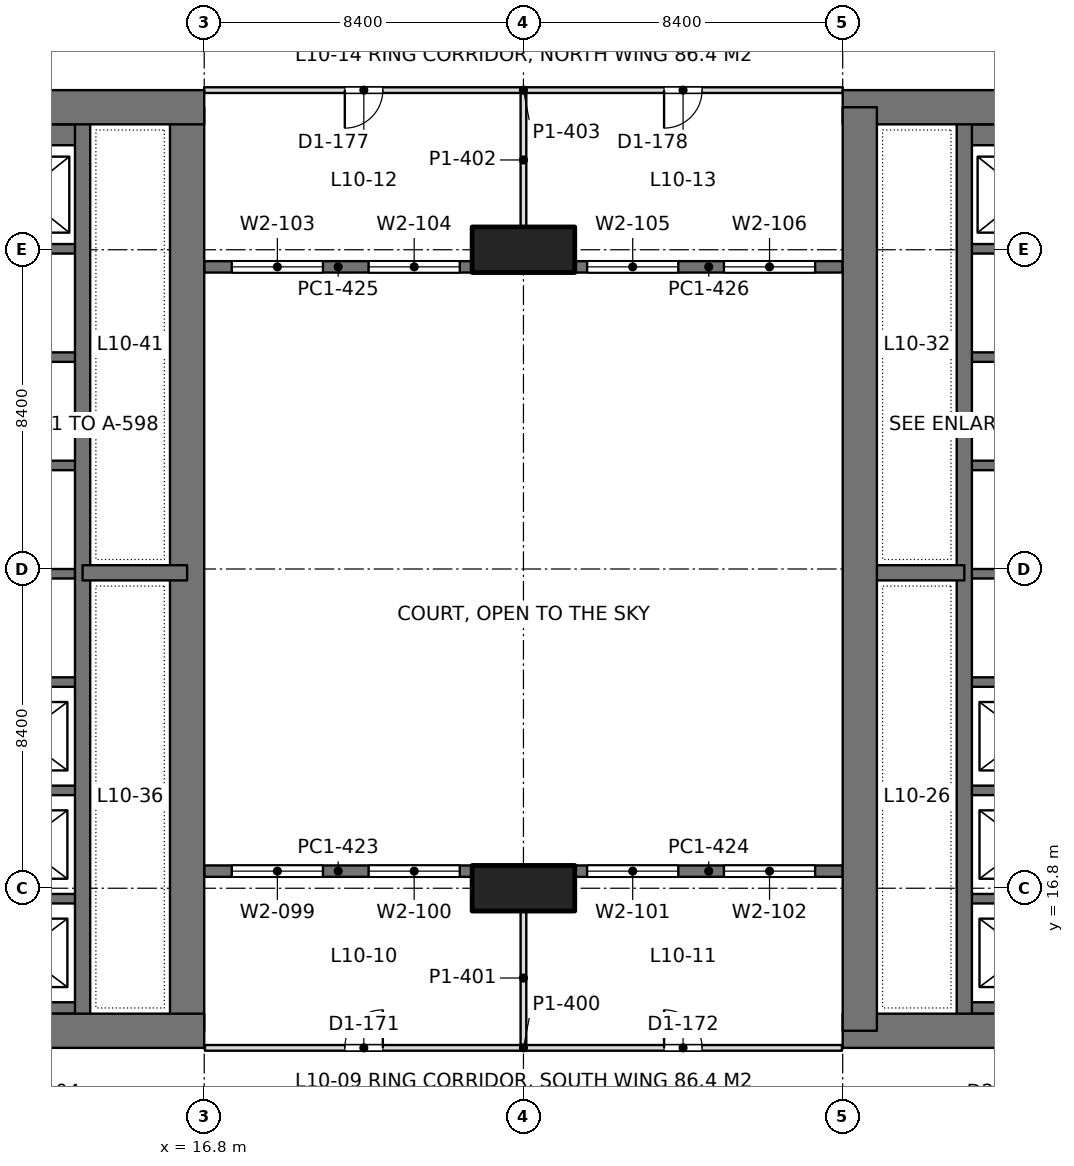
"""IFC4 building model, lengths in metres.
Left out: names, types, materials, properties, quantities, classifications, styles, units other than length and angle.
Written with IfcOpenShell. Run it as: python <this file> out.ifc"""

import sys

from ifc_helpers import new_model, si_unit, direction, frame, frame_2d, origin, origin_2d, place, context, subcontext, project, spatial, rectangle, extrude, element, fill, save


model = new_model("IFC4")
c1 = context("Model", 3, precision=1e-05, world=origin(), true_north=direction((0.0, 1.0)))
c2 = subcontext(c1, "Body", "Model", "MODEL_VIEW")
j1 = project(units=[si_unit("LENGTHUNIT", "METRE"), si_unit("PLANEANGLEUNIT", "RADIAN")], contexts=[c1])
p1 = place(None, origin())
s1 = spatial("IfcSite", under=j1, at=p1, CompositionType="ELEMENT")
p2 = place(p1, origin())
s2 = spatial("IfcBuilding", under=s1, at=p2, CompositionType="ELEMENT")
p3 = place(p2, frame((0.0, 0.0, 45.9)))
s3 = spatial("IfcBuildingStorey", under=s2, at=p3, CompositionType="ELEMENT", Elevation=45.9)
for number, where, z_axis, x_axis in (
    (1, (25.2, 16.8, 0.0), (0.0, 0.0, 1.0), (1.0, 0.0, 0.0)),
    (2, (25.2, 33.6, 0.0), (0.0, 0.0, 1.0), (1.0, 0.0, 0.0)),
):
    element("IfcColumn", number, at=place(p3, frame(where, z_axis=z_axis, x_axis=x_axis)), inside=s3, PredefinedType="COLUMN", context=c2, shape_type="SweptSolid", body=[
        extrude(rectangle(XDim=2.7, YDim=1.2, at=origin_2d()), origin(), (0.0, 0.0, 1.0), 4.5),
    ])
p4 = place(p3, frame((-1.2, 13.05, 0.0), z_axis=(0.0, 0.0, 1.0), x_axis=(1.0, 0.0, 0.0)))
e3 = element("IfcWall", 3, at=p4, inside=s3, PredefinedType="SHEAR", context=c2, shape_type="SweptSolid", body=[
    extrude(rectangle(XDim=18.0, YDim=0.9, at=frame_2d((9.0, 0.0))), origin(), (0.0, 0.0, 1.0), 4.5),
])
p5 = place(p4, frame((8.95, 0.0, 0.0)))
e4 = element("IfcOpeningElement", 4, at=p5, cuts=e3, PredefinedType="OPENING", context=c2, shape_type="SweptSolid", body=[
    extrude(rectangle(XDim=1.8, YDim=2.4, at=frame_2d((0.9, 1.2))), frame((0.0, 0.46, 0.0), z_axis=(0.0, -1.0, 0.0), x_axis=(1.0, 0.0, 0.0)), (0.0, 0.0, 1.0), 0.92),
])
p6 = place(p3, frame((-1.2, 37.35, 0.0), z_axis=(0.0, 0.0, 1.0), x_axis=(1.0, 0.0, 0.0)))
e5 = element("IfcWall", 5, at=p6, inside=s3, PredefinedType="SHEAR", context=c2, shape_type="SweptSolid", body=[
    extrude(rectangle(XDim=18.0, YDim=0.9, at=frame_2d((9.0, 0.0))), origin(), (0.0, 0.0, 1.0), 4.5),
])
p7 = place(p6, frame((8.95, 0.0, 0.0)))
e6 = element("IfcOpeningElement", 6, at=p7, cuts=e5, PredefinedType="OPENING", context=c2, shape_type="SweptSolid", body=[
    extrude(rectangle(XDim=1.8, YDim=2.4, at=frame_2d((0.9, 1.2))), frame((0.0, 0.46, 0.0), z_axis=(0.0, -1.0, 0.0), x_axis=(1.0, 0.0, 0.0)), (0.0, 0.0, 1.0), 0.92),
])
p8 = place(p3, frame((16.35, 13.05, 0.0), z_axis=(0.0, 0.0, 1.0), x_axis=(0.0, 1.0, 0.0)))
e7 = element("IfcWall", 7, at=p8, inside=s3, PredefinedType="SHEAR", context=c2, shape_type="SweptSolid", body=[
    extrude(rectangle(XDim=24.3, YDim=0.9, at=frame_2d((12.15, 0.0))), origin(), (0.0, 0.0, 1.0), 4.5),
])
p9 = place(p3, frame((13.6, 13.05, 0.0), z_axis=(0.0, 0.0, 1.0), x_axis=(0.0, 1.0, 0.0)))
e8 = element("IfcWall", 8, at=p9, inside=s3, PredefinedType="SHEAR", context=c2, shape_type="SweptSolid", body=[
    extrude(rectangle(XDim=24.3, YDim=0.4, at=frame_2d((12.15, 0.0))), origin(), (0.0, 0.0, 1.0), 4.5),
])
p10 = place(p3, frame((13.6, 25.1, 0.0), z_axis=(0.0, 0.0, 1.0), x_axis=(1.0, 0.0, 0.0)))
e9 = element("IfcWall", 9, at=p10, inside=s3, PredefinedType="SHEAR", context=c2, shape_type="SweptSolid", body=[
    extrude(rectangle(XDim=2.75, YDim=0.4, at=frame_2d((1.375, 0.0))), origin(), (0.0, 0.0, 1.0), 4.5),
])
p11 = place(p3, frame((10.4, 13.65, 0.0), z_axis=(0.0, 0.0, 1.0), x_axis=(1.0, 0.0, 0.0)))
e10 = element("IfcWall", 10, at=p11, inside=s3, PredefinedType="SHEAR", context=c2, shape_type="SweptSolid", body=[
    extrude(rectangle(XDim=3.2, YDim=0.3, at=frame_2d((1.6, 0.0))), origin(), (0.0, 0.0, 1.0), 4.5),
])
for number, where, z_axis, x_axis in (
    (11, (10.4, 16.525, 0.0), (0.0, 0.0, 1.0), (1.0, 0.0, 0.0)),
    (12, (10.4, 19.375, 0.0), (0.0, 0.0, 1.0), (1.0, 0.0, 0.0)),
    (13, (10.4, 22.225, 0.0), (0.0, 0.0, 1.0), (1.0, 0.0, 0.0)),
    (14, (10.4, 25.075, 0.0), (0.0, 0.0, 1.0), (1.0, 0.0, 0.0)),
    (15, (10.4, 27.925, 0.0), (0.0, 0.0, 1.0), (1.0, 0.0, 0.0)),
    (16, (10.4, 30.775, 0.0), (0.0, 0.0, 1.0), (1.0, 0.0, 0.0)),
    (17, (10.4, 33.625, 0.0), (0.0, 0.0, 1.0), (1.0, 0.0, 0.0)),
):
    element("IfcWall", number, at=place(p3, frame(where, z_axis=z_axis, x_axis=x_axis)), inside=s3, PredefinedType="SHEAR", context=c2, shape_type="SweptSolid", body=[
        extrude(rectangle(XDim=3.2, YDim=0.25, at=frame_2d((1.6, 0.0))), origin(), (0.0, 0.0, 1.0), 4.5),
    ])
p12 = place(p3, frame((10.4, 36.625, 0.0), z_axis=(0.0, 0.0, 1.0), x_axis=(1.0, 0.0, 0.0)))
e18 = element("IfcWall", 18, at=p12, inside=s3, PredefinedType="SHEAR", context=c2, shape_type="SweptSolid", body=[
    extrude(rectangle(XDim=3.2, YDim=0.55, at=frame_2d((1.6, 0.0))), origin(), (0.0, 0.0, 1.0), 4.5),
])
p13 = place(p3, frame((33.6, 13.05, 0.0), z_axis=(0.0, 0.0, 1.0), x_axis=(1.0, 0.0, 0.0)))
e19 = element("IfcWall", 19, at=p13, inside=s3, PredefinedType="SHEAR", context=c2, shape_type="SweptSolid", body=[
    extrude(rectangle(XDim=18.0, YDim=0.9, at=frame_2d((9.0, 0.0))), origin(), (0.0, 0.0, 1.0), 4.5),
])
p14 = place(p13, frame((7.25, 0.0, 0.0)))
e20 = element("IfcOpeningElement", 20, at=p14, cuts=e19, PredefinedType="OPENING", context=c2, shape_type="SweptSolid", body=[
    extrude(rectangle(XDim=1.8, YDim=2.4, at=frame_2d((0.9, 1.2))), frame((0.0, 0.46, 0.0), z_axis=(0.0, -1.0, 0.0), x_axis=(1.0, 0.0, 0.0)), (0.0, 0.0, 1.0), 0.92),
])
p15 = place(p3, frame((33.6, 37.35, 0.0), z_axis=(0.0, 0.0, 1.0), x_axis=(1.0, 0.0, 0.0)))
e21 = element("IfcWall", 21, at=p15, inside=s3, PredefinedType="SHEAR", context=c2, shape_type="SweptSolid", body=[
    extrude(rectangle(XDim=18.0, YDim=0.9, at=frame_2d((9.0, 0.0))), origin(), (0.0, 0.0, 1.0), 4.5),
])
p16 = place(p15, frame((7.25, 0.0, 0.0)))
e22 = element("IfcOpeningElement", 22, at=p16, cuts=e21, PredefinedType="OPENING", context=c2, shape_type="SweptSolid", body=[
    extrude(rectangle(XDim=1.8, YDim=2.4, at=frame_2d((0.9, 1.2))), frame((0.0, 0.46, 0.0), z_axis=(0.0, -1.0, 0.0), x_axis=(1.0, 0.0, 0.0)), (0.0, 0.0, 1.0), 0.92),
])
p17 = place(p3, frame((34.05, 13.05, 0.0), z_axis=(0.0, 0.0, 1.0), x_axis=(0.0, 1.0, 0.0)))
e23 = element("IfcWall", 23, at=p17, inside=s3, PredefinedType="SHEAR", context=c2, shape_type="SweptSolid", body=[
    extrude(rectangle(XDim=24.3, YDim=0.9, at=frame_2d((12.15, 0.0))), origin(), (0.0, 0.0, 1.0), 4.5),
])
p18 = place(p3, frame((36.8, 13.05, 0.0), z_axis=(0.0, 0.0, 1.0), x_axis=(0.0, 1.0, 0.0)))
e24 = element("IfcWall", 24, at=p18, inside=s3, PredefinedType="SHEAR", context=c2, shape_type="SweptSolid", body=[
    extrude(rectangle(XDim=24.3, YDim=0.4, at=frame_2d((12.15, 0.0))), origin(), (0.0, 0.0, 1.0), 4.5),
])
p19 = place(p3, frame((36.8, 25.1, 0.0), z_axis=(0.0, 0.0, 1.0), x_axis=(-1.0, 0.0, 0.0)))
e25 = element("IfcWall", 25, at=p19, inside=s3, PredefinedType="SHEAR", context=c2, shape_type="SweptSolid", body=[
    extrude(rectangle(XDim=2.75, YDim=0.4, at=frame_2d((1.375, 0.0))), origin(), (0.0, 0.0, 1.0), 4.5),
])
p20 = place(p3, frame((40.0, 13.65, 0.0), z_axis=(0.0, 0.0, 1.0), x_axis=(-1.0, 0.0, 0.0)))
e26 = element("IfcWall", 26, at=p20, inside=s3, PredefinedType="SHEAR", context=c2, shape_type="SweptSolid", body=[
    extrude(rectangle(XDim=3.2, YDim=0.3, at=frame_2d((1.6, 0.0))), origin(), (0.0, 0.0, 1.0), 4.5),
])
for number, where, z_axis, x_axis in (
    (27, (40.0, 16.525, 0.0), (0.0, 0.0, 1.0), (-1.0, 0.0, 0.0)),
    (28, (40.0, 19.375, 0.0), (0.0, 0.0, 1.0), (-1.0, 0.0, 0.0)),
    (29, (40.0, 22.225, 0.0), (0.0, 0.0, 1.0), (-1.0, 0.0, 0.0)),
    (30, (40.0, 25.075, 0.0), (0.0, 0.0, 1.0), (-1.0, 0.0, 0.0)),
    (31, (40.0, 27.925, 0.0), (0.0, 0.0, 1.0), (-1.0, 0.0, 0.0)),
    (32, (40.0, 30.775, 0.0), (0.0, 0.0, 1.0), (-1.0, 0.0, 0.0)),
    (33, (40.0, 33.625, 0.0), (0.0, 0.0, 1.0), (-1.0, 0.0, 0.0)),
):
    element("IfcWall", number, at=place(p3, frame(where, z_axis=z_axis, x_axis=x_axis)), inside=s3, PredefinedType="SHEAR", context=c2, shape_type="SweptSolid", body=[
        extrude(rectangle(XDim=3.2, YDim=0.25, at=frame_2d((1.6, 0.0))), origin(), (0.0, 0.0, 1.0), 4.5),
    ])
p21 = place(p3, frame((40.0, 36.625, 0.0), z_axis=(0.0, 0.0, 1.0), x_axis=(-1.0, 0.0, 0.0)))
e34 = element("IfcWall", 34, at=p21, inside=s3, PredefinedType="SHEAR", context=c2, shape_type="SweptSolid", body=[
    extrude(rectangle(XDim=3.2, YDim=0.55, at=frame_2d((1.6, 0.0))), origin(), (0.0, 0.0, 1.0), 4.5),
])
p22 = place(p3, frame((16.8, 17.25, 0.0), z_axis=(0.0, 0.0, 1.0), x_axis=(1.0, 0.0, 0.0)))
e35 = element("IfcWall", 35, at=p22, inside=s3, PredefinedType="SOLIDWALL", context=c2, shape_type="SweptSolid", body=[
    extrude(rectangle(XDim=7.05, YDim=0.3, at=frame_2d((3.525, 0.0))), origin(), (0.0, 0.0, 1.0), 4.34),
])
p23 = place(p22, frame((0.725, 0.0, 0.9)))
e36 = element("IfcOpeningElement", 36, at=p23, cuts=e35, PredefinedType="OPENING", context=c2, shape_type="SweptSolid", body=[
    extrude(rectangle(XDim=2.4, YDim=1.9, at=frame_2d((1.2, 0.95))), frame((0.0, 0.16, 0.0), z_axis=(0.0, -1.0, 0.0), x_axis=(1.0, 0.0, 0.0)), (0.0, 0.0, 1.0), 0.32),
])
p24 = place(p22, frame((4.325, 0.0, 0.9)))
e37 = element("IfcOpeningElement", 37, at=p24, cuts=e35, PredefinedType="OPENING", context=c2, shape_type="SweptSolid", body=[
    extrude(rectangle(XDim=2.4, YDim=1.9, at=frame_2d((1.2, 0.95))), frame((0.0, 0.16, 0.0), z_axis=(0.0, -1.0, 0.0), x_axis=(1.0, 0.0, 0.0)), (0.0, 0.0, 1.0), 0.32),
])
p25 = place(p3, frame((26.55, 17.25, 0.0), z_axis=(0.0, 0.0, 1.0), x_axis=(1.0, 0.0, 0.0)))
e38 = element("IfcWall", 38, at=p25, inside=s3, PredefinedType="SOLIDWALL", context=c2, shape_type="SweptSolid", body=[
    extrude(rectangle(XDim=7.05, YDim=0.3, at=frame_2d((3.525, 0.0))), origin(), (0.0, 0.0, 1.0), 4.34),
])
p26 = place(p25, frame((0.325, 0.0, 0.9)))
e39 = element("IfcOpeningElement", 39, at=p26, cuts=e38, PredefinedType="OPENING", context=c2, shape_type="SweptSolid", body=[
    extrude(rectangle(XDim=2.4, YDim=1.9, at=frame_2d((1.2, 0.95))), frame((0.0, 0.16, 0.0), z_axis=(0.0, -1.0, 0.0), x_axis=(1.0, 0.0, 0.0)), (0.0, 0.0, 1.0), 0.32),
])
p27 = place(p25, frame((3.925, 0.0, 0.9)))
e40 = element("IfcOpeningElement", 40, at=p27, cuts=e38, PredefinedType="OPENING", context=c2, shape_type="SweptSolid", body=[
    extrude(rectangle(XDim=2.4, YDim=1.9, at=frame_2d((1.2, 0.95))), frame((0.0, 0.16, 0.0), z_axis=(0.0, -1.0, 0.0), x_axis=(1.0, 0.0, 0.0)), (0.0, 0.0, 1.0), 0.32),
])
p28 = place(p3, frame((16.8, 33.15, 0.0), z_axis=(0.0, 0.0, 1.0), x_axis=(1.0, 0.0, 0.0)))
e41 = element("IfcWall", 41, at=p28, inside=s3, PredefinedType="SOLIDWALL", context=c2, shape_type="SweptSolid", body=[
    extrude(rectangle(XDim=7.05, YDim=0.3, at=frame_2d((3.525, 0.0))), origin(), (0.0, 0.0, 1.0), 4.34),
])
p29 = place(p28, frame((0.725, 0.0, 0.9)))
e42 = element("IfcOpeningElement", 42, at=p29, cuts=e41, PredefinedType="OPENING", context=c2, shape_type="SweptSolid", body=[
    extrude(rectangle(XDim=2.4, YDim=1.9, at=frame_2d((1.2, 0.95))), frame((0.0, 0.16, 0.0), z_axis=(0.0, -1.0, 0.0), x_axis=(1.0, 0.0, 0.0)), (0.0, 0.0, 1.0), 0.32),
])
p30 = place(p28, frame((4.325, 0.0, 0.9)))
e43 = element("IfcOpeningElement", 43, at=p30, cuts=e41, PredefinedType="OPENING", context=c2, shape_type="SweptSolid", body=[
    extrude(rectangle(XDim=2.4, YDim=1.9, at=frame_2d((1.2, 0.95))), frame((0.0, 0.16, 0.0), z_axis=(0.0, -1.0, 0.0), x_axis=(1.0, 0.0, 0.0)), (0.0, 0.0, 1.0), 0.32),
])
p31 = place(p3, frame((26.55, 33.15, 0.0), z_axis=(0.0, 0.0, 1.0), x_axis=(1.0, 0.0, 0.0)))
e44 = element("IfcWall", 44, at=p31, inside=s3, PredefinedType="SOLIDWALL", context=c2, shape_type="SweptSolid", body=[
    extrude(rectangle(XDim=7.05, YDim=0.3, at=frame_2d((3.525, 0.0))), origin(), (0.0, 0.0, 1.0), 4.34),
])
p32 = place(p31, frame((0.325, 0.0, 0.9)))
e45 = element("IfcOpeningElement", 45, at=p32, cuts=e44, PredefinedType="OPENING", context=c2, shape_type="SweptSolid", body=[
    extrude(rectangle(XDim=2.4, YDim=1.9, at=frame_2d((1.2, 0.95))), frame((0.0, 0.16, 0.0), z_axis=(0.0, -1.0, 0.0), x_axis=(1.0, 0.0, 0.0)), (0.0, 0.0, 1.0), 0.32),
])
p33 = place(p31, frame((3.925, 0.0, 0.9)))
e46 = element("IfcOpeningElement", 46, at=p33, cuts=e44, PredefinedType="OPENING", context=c2, shape_type="SweptSolid", body=[
    extrude(rectangle(XDim=2.4, YDim=1.9, at=frame_2d((1.2, 0.95))), frame((0.0, 0.16, 0.0), z_axis=(0.0, -1.0, 0.0), x_axis=(1.0, 0.0, 0.0)), (0.0, 0.0, 1.0), 0.32),
])
p34 = place(p3, frame((16.82, 12.6, 0.0), z_axis=(0.0, 0.0, 1.0), x_axis=(1.0, 0.0, 0.0)))
e47 = element("IfcWall", 47, at=p34, inside=s3, PredefinedType="PARTITIONING", context=c2, shape_type="SweptSolid", body=[
    extrude(rectangle(XDim=16.76, YDim=0.15, at=frame_2d((8.38, 0.0))), origin(), (0.0, 0.0, 1.0), 3.74),
])
p35 = place(p34, frame((3.68, 0.0, 0.0)))
e48 = element("IfcOpeningElement", 48, at=p35, cuts=e47, PredefinedType="OPENING", context=c2, shape_type="SweptSolid", body=[
    extrude(rectangle(XDim=1.0, YDim=2.2, at=frame_2d((0.5, 1.1))), frame((0.0, 0.085, 0.0), z_axis=(0.0, -1.0, 0.0), x_axis=(1.0, 0.0, 0.0)), (0.0, 0.0, 1.0), 0.17),
])
p36 = place(p34, frame((12.08, 0.0, 0.0)))
e49 = element("IfcOpeningElement", 49, at=p36, cuts=e47, PredefinedType="OPENING", context=c2, shape_type="SweptSolid", body=[
    extrude(rectangle(XDim=1.0, YDim=2.2, at=frame_2d((0.5, 1.1))), frame((0.0, 0.085, 0.0), z_axis=(0.0, -1.0, 0.0), x_axis=(1.0, 0.0, 0.0)), (0.0, 0.0, 1.0), 0.17),
])
p37 = place(p3, frame((25.2, 12.674, 0.0), z_axis=(0.0, 0.0, 1.0), x_axis=(0.0, 1.0, 0.0)))
e50 = element("IfcWall", 50, at=p37, inside=s3, PredefinedType="PARTITIONING", context=c2, shape_type="SweptSolid", body=[
    extrude(rectangle(XDim=3.527, YDim=0.15, at=frame_2d((1.763, 0.0))), origin(), (0.0, 0.0, 1.0), 3.74),
])
p38 = place(p3, frame((16.798, 37.8, 0.0), z_axis=(0.0, 0.0, 1.0), x_axis=(1.0, 0.0, 0.0)))
e51 = element("IfcWall", 51, at=p38, inside=s3, PredefinedType="PARTITIONING", context=c2, shape_type="SweptSolid", body=[
    extrude(rectangle(XDim=16.804, YDim=0.15, at=frame_2d((8.402, 0.0))), origin(), (0.0, 0.0, 1.0), 3.74),
])
p39 = place(p38, frame((3.702, 0.0, 0.0)))
e52 = element("IfcOpeningElement", 52, at=p39, cuts=e51, PredefinedType="OPENING", context=c2, shape_type="SweptSolid", body=[
    extrude(rectangle(XDim=1.0, YDim=2.2, at=frame_2d((0.5, 1.1))), frame((0.0, 0.085, 0.0), z_axis=(0.0, -1.0, 0.0), x_axis=(1.0, 0.0, 0.0)), (0.0, 0.0, 1.0), 0.17),
])
p40 = place(p38, frame((12.102, 0.0, 0.0)))
e53 = element("IfcOpeningElement", 53, at=p40, cuts=e51, PredefinedType="OPENING", context=c2, shape_type="SweptSolid", body=[
    extrude(rectangle(XDim=1.0, YDim=2.2, at=frame_2d((0.5, 1.1))), frame((0.0, 0.085, 0.0), z_axis=(0.0, -1.0, 0.0), x_axis=(1.0, 0.0, 0.0)), (0.0, 0.0, 1.0), 0.17),
])
p41 = place(p3, frame((25.2, 34.199, 0.0), z_axis=(0.0, 0.0, 1.0), x_axis=(0.0, 1.0, 0.0)))
e54 = element("IfcWall", 54, at=p41, inside=s3, PredefinedType="PARTITIONING", context=c2, shape_type="SweptSolid", body=[
    extrude(rectangle(XDim=3.527, YDim=0.15, at=frame_2d((1.764, 0.0))), origin(), (0.0, 0.0, 1.0), 3.74),
])
p42 = place(p23, origin())
e55 = element("IfcWindow", 55, at=p42, inside=s3, PartitioningType="SINGLE_PANEL", PredefinedType="WINDOW", context=c2, shape_type="SweptSolid", body=[
    extrude(rectangle(XDim=2.4, YDim=1.9, at=frame_2d((1.2, 0.95))), frame((0.0, 0.03, 0.0), z_axis=(0.0, -1.0, 0.0), x_axis=(1.0, 0.0, 0.0)), (0.0, 0.0, 1.0), 0.06),
])
fill(e36, e55)
p43 = place(p24, origin())
e56 = element("IfcWindow", 56, at=p43, inside=s3, PartitioningType="SINGLE_PANEL", PredefinedType="WINDOW", context=c2, shape_type="SweptSolid", body=[
    extrude(rectangle(XDim=2.4, YDim=1.9, at=frame_2d((1.2, 0.95))), frame((0.0, 0.03, 0.0), z_axis=(0.0, -1.0, 0.0), x_axis=(1.0, 0.0, 0.0)), (0.0, 0.0, 1.0), 0.06),
])
fill(e37, e56)
p44 = place(p26, origin())
e57 = element("IfcWindow", 57, at=p44, inside=s3, PartitioningType="SINGLE_PANEL", PredefinedType="WINDOW", context=c2, shape_type="SweptSolid", body=[
    extrude(rectangle(XDim=2.4, YDim=1.9, at=frame_2d((1.2, 0.95))), frame((0.0, 0.03, 0.0), z_axis=(0.0, -1.0, 0.0), x_axis=(1.0, 0.0, 0.0)), (0.0, 0.0, 1.0), 0.06),
])
fill(e39, e57)
p45 = place(p27, origin())
e58 = element("IfcWindow", 58, at=p45, inside=s3, PartitioningType="SINGLE_PANEL", PredefinedType="WINDOW", context=c2, shape_type="SweptSolid", body=[
    extrude(rectangle(XDim=2.4, YDim=1.9, at=frame_2d((1.2, 0.95))), frame((0.0, 0.03, 0.0), z_axis=(0.0, -1.0, 0.0), x_axis=(1.0, 0.0, 0.0)), (0.0, 0.0, 1.0), 0.06),
])
fill(e40, e58)
p46 = place(p29, origin())
e59 = element("IfcWindow", 59, at=p46, inside=s3, PartitioningType="SINGLE_PANEL", PredefinedType="WINDOW", context=c2, shape_type="SweptSolid", body=[
    extrude(rectangle(XDim=2.4, YDim=1.9, at=frame_2d((1.2, 0.95))), frame((0.0, 0.03, 0.0), z_axis=(0.0, -1.0, 0.0), x_axis=(1.0, 0.0, 0.0)), (0.0, 0.0, 1.0), 0.06),
])
fill(e42, e59)
p47 = place(p30, origin())
e60 = element("IfcWindow", 60, at=p47, inside=s3, PartitioningType="SINGLE_PANEL", PredefinedType="WINDOW", context=c2, shape_type="SweptSolid", body=[
    extrude(rectangle(XDim=2.4, YDim=1.9, at=frame_2d((1.2, 0.95))), frame((0.0, 0.03, 0.0), z_axis=(0.0, -1.0, 0.0), x_axis=(1.0, 0.0, 0.0)), (0.0, 0.0, 1.0), 0.06),
])
fill(e43, e60)
p48 = place(p32, origin())
e61 = element("IfcWindow", 61, at=p48, inside=s3, PartitioningType="SINGLE_PANEL", PredefinedType="WINDOW", context=c2, shape_type="SweptSolid", body=[
    extrude(rectangle(XDim=2.4, YDim=1.9, at=frame_2d((1.2, 0.95))), frame((0.0, 0.03, 0.0), z_axis=(0.0, -1.0, 0.0), x_axis=(1.0, 0.0, 0.0)), (0.0, 0.0, 1.0), 0.06),
])
fill(e45, e61)
p49 = place(p33, origin())
e62 = element("IfcWindow", 62, at=p49, inside=s3, PartitioningType="SINGLE_PANEL", PredefinedType="WINDOW", context=c2, shape_type="SweptSolid", body=[
    extrude(rectangle(XDim=2.4, YDim=1.9, at=frame_2d((1.2, 0.95))), frame((0.0, 0.03, 0.0), z_axis=(0.0, -1.0, 0.0), x_axis=(1.0, 0.0, 0.0)), (0.0, 0.0, 1.0), 0.06),
])
fill(e46, e62)
p50 = place(p35, origin())
e63 = element("IfcDoor", 63, at=p50, inside=s3, OperationType="SINGLE_SWING_RIGHT", PredefinedType="DOOR", context=c2, shape_type="SweptSolid", body=[
    extrude(rectangle(XDim=1.0, YDim=2.2, at=frame_2d((0.5, 1.1))), frame((0.0, 0.025, 0.0), z_axis=(0.0, -1.0, 0.0), x_axis=(1.0, 0.0, 0.0)), (0.0, 0.0, 1.0), 0.05),
])
fill(e48, e63)
p51 = place(p36, origin())
e64 = element("IfcDoor", 64, at=p51, inside=s3, OperationType="SINGLE_SWING_LEFT", PredefinedType="DOOR", context=c2, shape_type="SweptSolid", body=[
    extrude(rectangle(XDim=1.0, YDim=2.2, at=frame_2d((0.5, 1.1))), frame((0.0, 0.025, 0.0), z_axis=(0.0, -1.0, 0.0), x_axis=(1.0, 0.0, 0.0)), (0.0, 0.0, 1.0), 0.05),
])
fill(e49, e64)
p52 = place(p39, frame((1.0, 0.0, 0.0), z_axis=(0.0, 0.0, 1.0), x_axis=(-1.0, 0.0, 0.0)))
e65 = element("IfcDoor", 65, at=p52, inside=s3, OperationType="SINGLE_SWING_RIGHT", PredefinedType="DOOR", context=c2, shape_type="SweptSolid", body=[
    extrude(rectangle(XDim=1.0, YDim=2.2, at=frame_2d((0.5, 1.1))), frame((0.0, 0.025, 0.0), z_axis=(0.0, -1.0, 0.0), x_axis=(1.0, 0.0, 0.0)), (0.0, 0.0, 1.0), 0.05),
])
fill(e52, e65)
p53 = place(p40, frame((1.0, 0.0, 0.0), z_axis=(0.0, 0.0, 1.0), x_axis=(-1.0, 0.0, 0.0)))
e66 = element("IfcDoor", 66, at=p53, inside=s3, OperationType="SINGLE_SWING_RIGHT", PredefinedType="DOOR", context=c2, shape_type="SweptSolid", body=[
    extrude(rectangle(XDim=1.0, YDim=2.2, at=frame_2d((0.5, 1.1))), frame((0.0, 0.025, 0.0), z_axis=(0.0, -1.0, 0.0), x_axis=(1.0, 0.0, 0.0)), (0.0, 0.0, 1.0), 0.05),
])
fill(e53, e66)
save(model, sys.argv[1])
